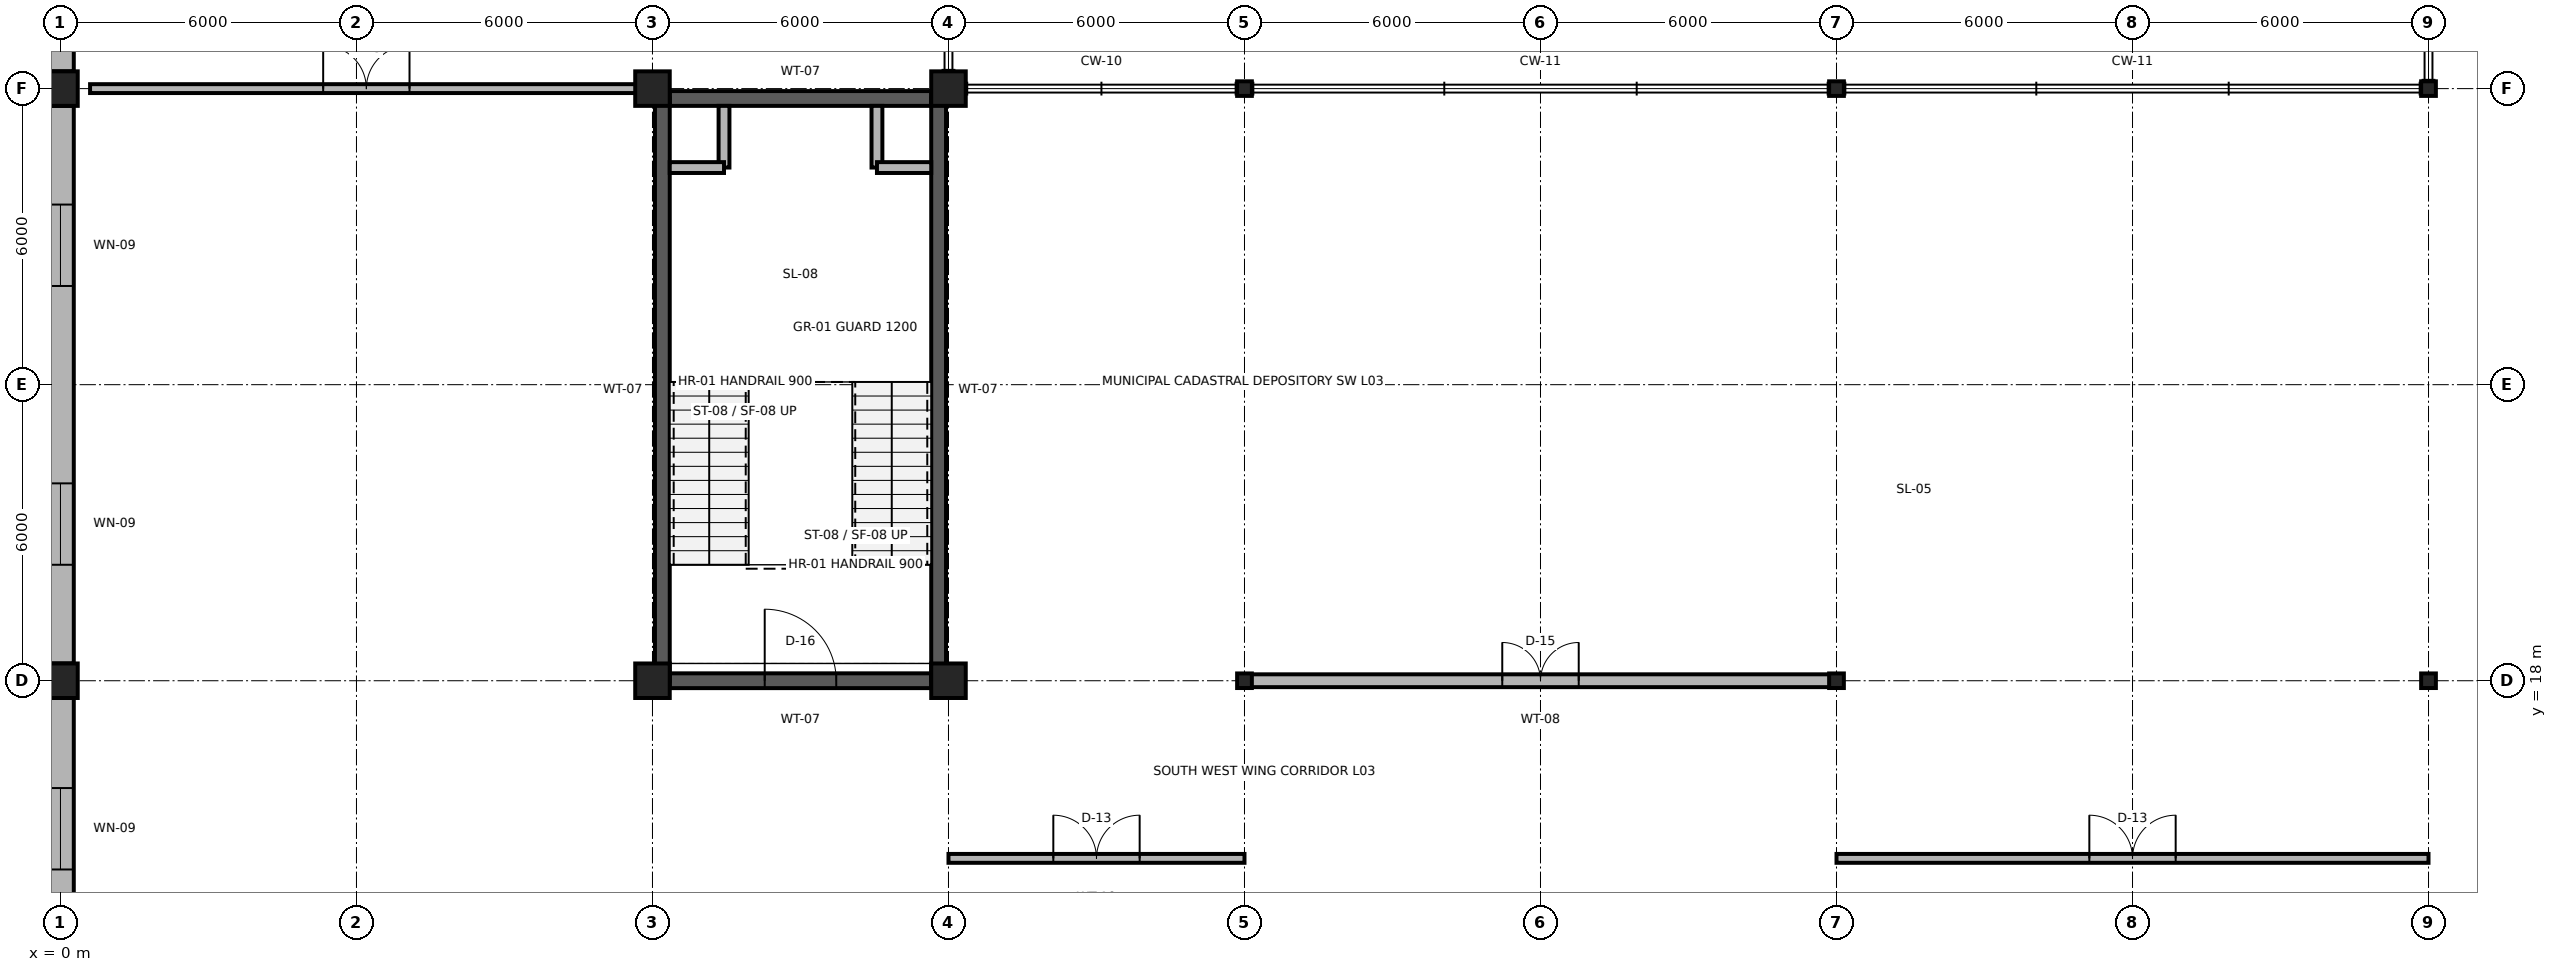
"""IFC4 building model, lengths in metres.
Left out: names, types, materials, properties, quantities, classifications, styles, units other than length and angle.
Written with IfcOpenShell. Run it as: python <this file> out.ifc"""

import sys

from ifc_helpers import new_model, si_unit, direction, frame, frame_2d, origin, origin_2d, place, context, subcontext, project, spatial, rectangle, i_section, extrude, element, fill, save


model = new_model("IFC4")
c1 = context("Model", 3, precision=1e-05, world=origin(), true_north=direction((0.0, 1.0)))
c2 = subcontext(c1, "Body", "Model", "MODEL_VIEW")
j1 = project(units=[si_unit("LENGTHUNIT", "METRE"), si_unit("PLANEANGLEUNIT", "RADIAN")], contexts=[c1])
p1 = place(None, origin())
s1 = spatial("IfcSite", under=j1, at=p1, CompositionType="ELEMENT")
p2 = place(p1, origin())
s2 = spatial("IfcBuilding", under=s1, at=p2, CompositionType="ELEMENT")
p3 = place(p2, frame((0.0, 0.0, 12.0)))
s3 = spatial("IfcBuildingStorey", under=s2, at=p3, CompositionType="ELEMENT", Elevation=12.0)
for number, where, z_axis, x_axis in (
    (1, (0.0, 18.0, 0.0), (0.0, 0.0, 1.0), (1.0, 0.0, 0.0)),
    (2, (12.0, 18.0, 0.0), (0.0, 0.0, 1.0), (1.0, 0.0, 0.0)),
    (3, (18.0, 18.0, 0.0), (0.0, 0.0, 1.0), (1.0, 0.0, 0.0)),
):
    element("IfcColumn", number, at=place(p3, frame(where, z_axis=z_axis, x_axis=x_axis)), inside=s3, PredefinedType="COLUMN", context=c2, shape_type="SweptSolid", body=[
        extrude(rectangle(XDim=0.7, YDim=0.7, at=origin_2d()), origin(), (0.0, 0.0, 1.0), 4.5),
    ])
for number, where, z_axis, x_axis in (
    (4, (24.0, 18.0, 0.0), (0.0, 0.0, 1.0), (1.0, 0.0, 0.0)),
    (5, (36.0, 18.0, 0.0), (0.0, 0.0, 1.0), (1.0, 0.0, 0.0)),
    (6, (48.0, 18.0, 0.0), (0.0, 0.0, 1.0), (1.0, 0.0, 0.0)),
):
    element("IfcColumn", number, at=place(p3, frame(where, z_axis=z_axis, x_axis=x_axis)), inside=s3, PredefinedType="COLUMN", context=c2, shape_type="SweptSolid", body=[
        extrude(i_section(OverallWidth=0.299, OverallDepth=0.296, WebThickness=0.009, FlangeThickness=0.014, FilletRadius=0.018, at=origin_2d()), origin(), (0.0, 0.0, 1.0), 4.5),
    ])
for number, where, z_axis, x_axis in (
    (7, (0.0, 30.0, 0.0), (0.0, 0.0, 1.0), (1.0, 0.0, 0.0)),
    (8, (12.0, 30.0, 0.0), (0.0, 0.0, 1.0), (1.0, 0.0, 0.0)),
    (9, (18.0, 30.0, 0.0), (0.0, 0.0, 1.0), (1.0, 0.0, 0.0)),
):
    element("IfcColumn", number, at=place(p3, frame(where, z_axis=z_axis, x_axis=x_axis)), inside=s3, PredefinedType="COLUMN", context=c2, shape_type="SweptSolid", body=[
        extrude(rectangle(XDim=0.7, YDim=0.7, at=origin_2d()), origin(), (0.0, 0.0, 1.0), 4.5),
    ])
for number, where, z_axis, x_axis in (
    (10, (24.0, 30.0, 0.0), (0.0, 0.0, 1.0), (1.0, 0.0, 0.0)),
    (11, (36.0, 30.0, 0.0), (0.0, 0.0, 1.0), (1.0, 0.0, 0.0)),
    (12, (48.0, 30.0, 0.0), (0.0, 0.0, 1.0), (1.0, 0.0, 0.0)),
):
    element("IfcColumn", number, at=place(p3, frame(where, z_axis=z_axis, x_axis=x_axis)), inside=s3, PredefinedType="COLUMN", context=c2, shape_type="SweptSolid", body=[
        extrude(i_section(OverallWidth=0.299, OverallDepth=0.296, WebThickness=0.009, FlangeThickness=0.014, FilletRadius=0.018, at=origin_2d()), origin(), (0.0, 0.0, 1.0), 4.5),
    ])
p4 = place(p3, frame((0.0, 12.35, 0.0), z_axis=(0.0, 0.0, 1.0), x_axis=(0.0, 1.0, 0.0)))
e13 = element("IfcWall", 13, at=p4, inside=s3, PredefinedType="SOLIDWALL", context=c2, shape_type="SweptSolid", body=[
    extrude(rectangle(XDim=5.3, YDim=0.54, at=frame_2d((2.65, 0.0))), origin(), (0.0, 0.0, 1.0), 3.77),
])
p5 = place(p4, frame((1.825, 0.0, 0.85)))
e14 = element("IfcOpeningElement", 14, at=p5, cuts=e13, PredefinedType="OPENING", context=c2, shape_type="SweptSolid", body=[
    extrude(rectangle(XDim=1.65, YDim=2.3, at=frame_2d((0.825, 1.15))), frame((0.0, 0.285, 0.0), z_axis=(0.0, -1.0, 0.0), x_axis=(1.0, 0.0, 0.0)), (0.0, 0.0, 1.0), 0.57),
])
p6 = place(p3, frame((0.0, 18.35, 0.0), z_axis=(0.0, 0.0, 1.0), x_axis=(0.0, 1.0, 0.0)))
e15 = element("IfcWall", 15, at=p6, inside=s3, PredefinedType="SOLIDWALL", context=c2, shape_type="SweptSolid", body=[
    extrude(rectangle(XDim=11.3, YDim=0.54, at=frame_2d((5.65, 0.0))), origin(), (0.0, 0.0, 1.0), 3.77),
])
p7 = place(p6, frame((2.0, 0.0, 0.85)))
e16 = element("IfcOpeningElement", 16, at=p7, cuts=e15, PredefinedType="OPENING", context=c2, shape_type="SweptSolid", body=[
    extrude(rectangle(XDim=1.65, YDim=2.3, at=frame_2d((0.825, 1.15))), frame((0.0, 0.285, 0.0), z_axis=(0.0, -1.0, 0.0), x_axis=(1.0, 0.0, 0.0)), (0.0, 0.0, 1.0), 0.57),
])
p8 = place(p6, frame((7.65, 0.0, 0.85)))
e17 = element("IfcOpeningElement", 17, at=p8, cuts=e15, PredefinedType="OPENING", context=c2, shape_type="SweptSolid", body=[
    extrude(rectangle(XDim=1.65, YDim=2.3, at=frame_2d((0.825, 1.15))), frame((0.0, 0.285, 0.0), z_axis=(0.0, -1.0, 0.0), x_axis=(1.0, 0.0, 0.0)), (0.0, 0.0, 1.0), 0.57),
])
p9 = place(p3, frame((0.0, 30.35, 0.0), z_axis=(0.0, 0.0, 1.0), x_axis=(0.0, 1.0, 0.0)))
e18 = element("IfcWall", 18, at=p9, inside=s3, PredefinedType="SOLIDWALL", context=c2, shape_type="SweptSolid", body=[
    extrude(rectangle(XDim=5.3, YDim=0.54, at=frame_2d((2.65, 0.0))), origin(), (0.0, 0.0, 1.0), 3.77),
])
p10 = place(p9, frame((1.825, 0.0, 0.85)))
e19 = element("IfcOpeningElement", 19, at=p10, cuts=e18, PredefinedType="OPENING", context=c2, shape_type="SweptSolid", body=[
    extrude(rectangle(XDim=1.65, YDim=2.3, at=frame_2d((0.825, 1.15))), frame((0.0, 0.285, 0.0), z_axis=(0.0, -1.0, 0.0), x_axis=(1.0, 0.0, 0.0)), (0.0, 0.0, 1.0), 0.57),
])
p11 = place(p3, frame((12.35, 18.0, 0.0), z_axis=(0.0, 0.0, 1.0), x_axis=(1.0, 0.0, 0.0)))
e20 = element("IfcWall", 20, at=p11, inside=s3, PredefinedType="SHEAR", context=c2, shape_type="SweptSolid", body=[
    extrude(rectangle(XDim=5.3, YDim=0.3, at=frame_2d((2.65, 0.0))), origin(), (0.0, 0.0, 1.0), 4.22),
])
p12 = place(p11, frame((1.925, 0.0, 0.0)))
e21 = element("IfcOpeningElement", 21, at=p12, cuts=e20, PredefinedType="OPENING", context=c2, shape_type="SweptSolid", body=[
    extrude(rectangle(XDim=1.45, YDim=2.25, at=frame_2d((0.725, 1.125))), frame((0.0, 0.165, 0.0), z_axis=(0.0, -1.0, 0.0), x_axis=(1.0, 0.0, 0.0)), (0.0, 0.0, 1.0), 0.33),
])
p13 = place(p3, frame((12.35, 29.8, 0.0), z_axis=(0.0, 0.0, 1.0), x_axis=(1.0, 0.0, 0.0)))
e22 = element("IfcWall", 22, at=p13, inside=s3, PredefinedType="SHEAR", context=c2, shape_type="SweptSolid", body=[
    extrude(rectangle(XDim=5.3, YDim=0.3, at=frame_2d((2.65, 0.0))), origin(), (0.0, 0.0, 1.0), 4.22),
])
for number, where, z_axis, x_axis in (
    (23, (12.2, 18.0, 0.0), (0.0, 0.0, 1.0), (0.0, 1.0, 0.0)),
    (24, (17.8, 18.0, 0.0), (0.0, 0.0, 1.0), (0.0, 1.0, 0.0)),
):
    element("IfcWall", number, at=place(p3, frame(where, z_axis=z_axis, x_axis=x_axis)), inside=s3, PredefinedType="SHEAR", context=c2, shape_type="SweptSolid", body=[
        extrude(rectangle(XDim=11.8, YDim=0.3, at=frame_2d((5.9, 0.0))), origin(), (0.0, 0.0, 1.0), 4.22),
    ])
p14 = place(p3, frame((13.45, 28.4, 0.0), z_axis=(0.0, 0.0, 1.0), x_axis=(0.0, 1.0, 0.0)))
e25 = element("IfcWall", 25, at=p14, inside=s3, PredefinedType="PARTITIONING", context=c2, shape_type="SweptSolid", body=[
    extrude(rectangle(XDim=1.25, YDim=0.22, at=frame_2d((0.625, 0.0))), origin(), (0.0, 0.0, 1.0), 4.22),
])
p15 = place(p3, frame((12.35, 28.4, 0.0), z_axis=(0.0, 0.0, 1.0), x_axis=(1.0, 0.0, 0.0)))
e26 = element("IfcWall", 26, at=p15, inside=s3, PredefinedType="PARTITIONING", context=c2, shape_type="SweptSolid", body=[
    extrude(rectangle(XDim=1.1, YDim=0.22, at=frame_2d((0.55, 0.0))), origin(), (0.0, 0.0, 1.0), 4.22),
])
p16 = place(p3, frame((16.55, 28.4, 0.0), z_axis=(0.0, 0.0, 1.0), x_axis=(0.0, 1.0, 0.0)))
e27 = element("IfcWall", 27, at=p16, inside=s3, PredefinedType="PARTITIONING", context=c2, shape_type="SweptSolid", body=[
    extrude(rectangle(XDim=1.25, YDim=0.22, at=frame_2d((0.625, 0.0))), origin(), (0.0, 0.0, 1.0), 4.22),
])
p17 = place(p3, frame((16.55, 28.4, 0.0), z_axis=(0.0, 0.0, 1.0), x_axis=(1.0, 0.0, 0.0)))
e28 = element("IfcWall", 28, at=p17, inside=s3, PredefinedType="PARTITIONING", context=c2, shape_type="SweptSolid", body=[
    extrude(rectangle(XDim=1.1, YDim=0.22, at=frame_2d((0.55, 0.0))), origin(), (0.0, 0.0, 1.0), 4.22),
])
p18 = place(p3, frame((18.0, 14.4, 0.0), z_axis=(0.0, 0.0, 1.0), x_axis=(1.0, 0.0, 0.0)))
e29 = element("IfcWall", 29, at=p18, inside=s3, PredefinedType="PARTITIONING", context=c2, shape_type="SweptSolid", body=[
    extrude(rectangle(XDim=6.0, YDim=0.18, at=frame_2d((3.0, 0.0))), origin(), (0.0, 0.0, 1.0), 4.22),
])
p19 = place(p18, frame((2.125, 0.0, 0.0)))
e30 = element("IfcOpeningElement", 30, at=p19, cuts=e29, PredefinedType="OPENING", context=c2, shape_type="SweptSolid", body=[
    extrude(rectangle(XDim=1.75, YDim=2.55, at=frame_2d((0.875, 1.275))), frame((0.0, 0.105, 0.0), z_axis=(0.0, -1.0, 0.0), x_axis=(1.0, 0.0, 0.0)), (0.0, 0.0, 1.0), 0.21),
])
p20 = place(p3, frame((36.0, 14.4, 0.0), z_axis=(0.0, 0.0, 1.0), x_axis=(1.0, 0.0, 0.0)))
e31 = element("IfcWall", 31, at=p20, inside=s3, PredefinedType="PARTITIONING", context=c2, shape_type="SweptSolid", body=[
    extrude(rectangle(XDim=12.0, YDim=0.18, at=frame_2d((6.0, 0.0))), origin(), (0.0, 0.0, 1.0), 4.22),
])
p21 = place(p20, frame((5.125, 0.0, 0.0)))
e32 = element("IfcOpeningElement", 32, at=p21, cuts=e31, PredefinedType="OPENING", context=c2, shape_type="SweptSolid", body=[
    extrude(rectangle(XDim=1.75, YDim=2.55, at=frame_2d((0.875, 1.275))), frame((0.0, 0.105, 0.0), z_axis=(0.0, -1.0, 0.0), x_axis=(1.0, 0.0, 0.0)), (0.0, 0.0, 1.0), 0.21),
])
p22 = place(p3, frame((0.6, 30.0, 0.0), z_axis=(0.0, 0.0, 1.0), x_axis=(1.0, 0.0, 0.0)))
e33 = element("IfcWall", 33, at=p22, inside=s3, PredefinedType="PARTITIONING", context=c2, shape_type="SweptSolid", body=[
    extrude(rectangle(XDim=11.2, YDim=0.18, at=frame_2d((5.6, 0.0))), origin(), (0.0, 0.0, 1.0), 3.638),
])
p23 = place(p22, frame((4.725, 0.0, 0.0)))
e34 = element("IfcOpeningElement", 34, at=p23, cuts=e33, PredefinedType="OPENING", context=c2, shape_type="SweptSolid", body=[
    extrude(rectangle(XDim=1.75, YDim=2.55, at=frame_2d((0.875, 1.275))), frame((0.0, 0.105, 0.0), z_axis=(0.0, -1.0, 0.0), x_axis=(1.0, 0.0, 0.0)), (0.0, 0.0, 1.0), 0.21),
])
p24 = place(p3, frame((24.0, 18.0, 0.0), z_axis=(0.0, 0.0, 1.0), x_axis=(1.0, 0.0, 0.0)))
e35 = element("IfcWall", 35, at=p24, inside=s3, PredefinedType="PARTITIONING", context=c2, shape_type="SweptSolid", body=[
    extrude(rectangle(XDim=12.0, YDim=0.26, at=frame_2d((6.0, 0.0))), origin(), (0.0, 0.0, 1.0), 3.638),
])
p25 = place(p24, frame((5.225, 0.0, 0.0)))
e36 = element("IfcOpeningElement", 36, at=p25, cuts=e35, PredefinedType="OPENING", context=c2, shape_type="SweptSolid", body=[
    extrude(rectangle(XDim=1.55, YDim=2.3, at=frame_2d((0.775, 1.15))), frame((0.0, 0.145, 0.0), z_axis=(0.0, -1.0, 0.0), x_axis=(1.0, 0.0, 0.0)), (0.0, 0.0, 1.0), 0.29),
])
p26 = place(p5, origin())
e37 = element("IfcWindow", 37, at=p26, inside=s3, PartitioningType="SINGLE_PANEL", PredefinedType="WINDOW", context=c2, shape_type="SweptSolid", body=[
    extrude(rectangle(XDim=1.65, YDim=2.3, at=frame_2d((0.825, 1.15))), frame((0.0, 0.03, 0.0), z_axis=(0.0, -1.0, 0.0), x_axis=(1.0, 0.0, 0.0)), (0.0, 0.0, 1.0), 0.06),
])
fill(e14, e37)
p27 = place(p7, origin())
e38 = element("IfcWindow", 38, at=p27, inside=s3, PartitioningType="SINGLE_PANEL", PredefinedType="WINDOW", context=c2, shape_type="SweptSolid", body=[
    extrude(rectangle(XDim=1.65, YDim=2.3, at=frame_2d((0.825, 1.15))), frame((0.0, 0.03, 0.0), z_axis=(0.0, -1.0, 0.0), x_axis=(1.0, 0.0, 0.0)), (0.0, 0.0, 1.0), 0.06),
])
fill(e16, e38)
p28 = place(p8, origin())
e39 = element("IfcWindow", 39, at=p28, inside=s3, PartitioningType="SINGLE_PANEL", PredefinedType="WINDOW", context=c2, shape_type="SweptSolid", body=[
    extrude(rectangle(XDim=1.65, YDim=2.3, at=frame_2d((0.825, 1.15))), frame((0.0, 0.03, 0.0), z_axis=(0.0, -1.0, 0.0), x_axis=(1.0, 0.0, 0.0)), (0.0, 0.0, 1.0), 0.06),
])
fill(e17, e39)
p29 = place(p12, origin())
e40 = element("IfcDoor", 40, at=p29, inside=s3, OperationType="SINGLE_SWING_LEFT", PredefinedType="DOOR", context=c2, shape_type="SweptSolid", body=[
    extrude(rectangle(XDim=1.45, YDim=2.25, at=frame_2d((0.725, 1.125))), frame((0.0, 0.025, 0.0), z_axis=(0.0, -1.0, 0.0), x_axis=(1.0, 0.0, 0.0)), (0.0, 0.0, 1.0), 0.05),
])
fill(e21, e40)
p30 = place(p19, origin())
e41 = element("IfcDoor", 41, at=p30, inside=s3, OperationType="DOUBLE_DOOR_SINGLE_SWING", PredefinedType="DOOR", context=c2, shape_type="SweptSolid", body=[
    extrude(rectangle(XDim=1.75, YDim=2.55, at=frame_2d((0.875, 1.275))), frame((0.0, 0.025, 0.0), z_axis=(0.0, -1.0, 0.0), x_axis=(1.0, 0.0, 0.0)), (0.0, 0.0, 1.0), 0.05),
])
fill(e30, e41)
p31 = place(p21, origin())
e42 = element("IfcDoor", 42, at=p31, inside=s3, OperationType="DOUBLE_DOOR_SINGLE_SWING", PredefinedType="DOOR", context=c2, shape_type="SweptSolid", body=[
    extrude(rectangle(XDim=1.75, YDim=2.55, at=frame_2d((0.875, 1.275))), frame((0.0, 0.025, 0.0), z_axis=(0.0, -1.0, 0.0), x_axis=(1.0, 0.0, 0.0)), (0.0, 0.0, 1.0), 0.05),
])
fill(e32, e42)
p32 = place(p23, origin())
e43 = element("IfcDoor", 43, at=p32, inside=s3, OperationType="DOUBLE_DOOR_SINGLE_SWING", PredefinedType="DOOR", context=c2, shape_type="SweptSolid", body=[
    extrude(rectangle(XDim=1.75, YDim=2.55, at=frame_2d((0.875, 1.275))), frame((0.0, 0.025, 0.0), z_axis=(0.0, -1.0, 0.0), x_axis=(1.0, 0.0, 0.0)), (0.0, 0.0, 1.0), 0.05),
])
fill(e34, e43)
p33 = place(p25, origin())
e44 = element("IfcDoor", 44, at=p33, inside=s3, OperationType="DOUBLE_DOOR_SINGLE_SWING", PredefinedType="DOOR", context=c2, shape_type="SweptSolid", body=[
    extrude(rectangle(XDim=1.55, YDim=2.3, at=frame_2d((0.775, 1.15))), frame((0.0, 0.025, 0.0), z_axis=(0.0, -1.0, 0.0), x_axis=(1.0, 0.0, 0.0)), (0.0, 0.0, 1.0), 0.05),
])
fill(e36, e44)
save(model, sys.argv[1])
